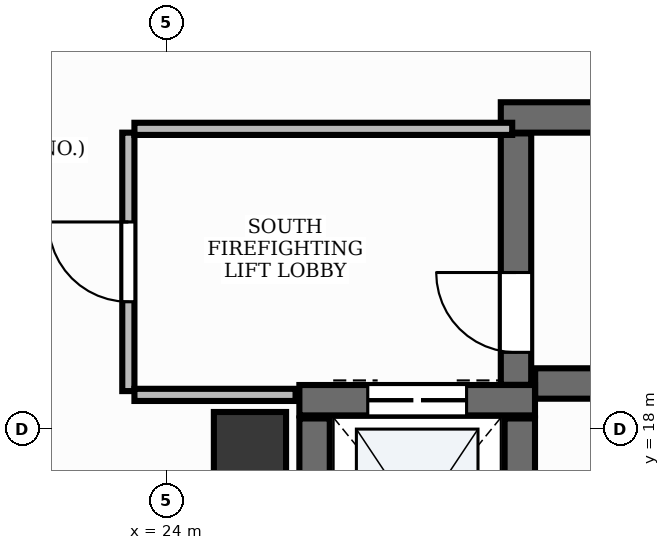
"""IFC4 building model, lengths in metres.
Left out: names, types, materials, properties, quantities, classifications, styles, units other than length and angle.
Written with IfcOpenShell. Run it as: python <this file> out.ifc"""

import sys

from ifc_helpers import new_model, si_unit, direction, frame, frame_2d, origin, origin_2d, place, context, subcontext, project, spatial, rectangle, extrude, element, fill, save


model = new_model("IFC4")
c1 = context("Model", 3, precision=1e-05, world=origin(), true_north=direction((0.0, 1.0)))
c2 = subcontext(c1, "Body", "Model", "MODEL_VIEW")
j1 = project(units=[si_unit("LENGTHUNIT", "METRE"), si_unit("PLANEANGLEUNIT", "RADIAN")], contexts=[c1])
p1 = place(None, origin())
s1 = spatial("IfcSite", under=j1, at=p1, CompositionType="ELEMENT")
p2 = place(p1, origin())
s2 = spatial("IfcBuilding", under=s1, at=p2, CompositionType="ELEMENT")
p3 = place(p2, frame((0.0, 0.0, 213.0)))
s3 = spatial("IfcBuildingStorey", under=s2, at=p3, CompositionType="ELEMENT", Elevation=213.0)
p4 = place(p3, frame((28.852, 18.6, 0.0), z_axis=(0.0, 0.0, 1.0), x_axis=(1.0, 0.0, 0.0)))
e1 = element("IfcWall", 1, at=p4, inside=s3, PredefinedType="SHEAR", context=c2, shape_type="SweptSolid", body=[
    extrude(rectangle(XDim=8.198, YDim=0.4, at=frame_2d((4.099, 0.0))), origin(), (0.0, 0.0, 1.0), 5.1),
])
p5 = place(p3, frame((28.4, 22.1, 0.0), z_axis=(0.0, 0.0, 1.0), x_axis=(1.0, 0.0, 0.0)))
e2 = element("IfcWall", 2, at=p5, inside=s3, PredefinedType="SHEAR", context=c2, shape_type="SweptSolid", body=[
    extrude(rectangle(XDim=8.65, YDim=0.4, at=frame_2d((4.325, 0.0))), origin(), (0.0, 0.0, 1.0), 5.1),
])
p6 = place(p3, frame((28.6, 18.582, 0.0), z_axis=(0.0, 0.0, 1.0), x_axis=(0.0, 1.0, 0.0)))
e3 = element("IfcWall", 3, at=p6, inside=s3, PredefinedType="SHEAR", context=c2, shape_type="SweptSolid", body=[
    extrude(rectangle(XDim=3.308, YDim=0.4, at=frame_2d((1.654, 0.0))), origin(), (0.0, 0.0, 1.0), 5.1),
])
p7 = place(p6, frame((0.428, 0.0, 0.0)))
e4 = element("IfcOpeningElement", 4, at=p7, cuts=e3, PredefinedType="OPENING", context=c2, shape_type="SweptSolid", body=[
    extrude(rectangle(XDim=1.05, YDim=2.15, at=frame_2d((0.525, 1.075))), frame((0.0, 0.215, 0.0), z_axis=(0.0, -1.0, 0.0), x_axis=(1.0, 0.0, 0.0)), (0.0, 0.0, 1.0), 0.43),
])
p8 = place(p3, frame((25.75, 18.38, 0.0), z_axis=(0.0, 0.0, 1.0), x_axis=(1.0, 0.0, 0.0)))
e5 = element("IfcWall", 5, at=p8, inside=s3, PredefinedType="SHEAR", context=c2, shape_type="SweptSolid", body=[
    extrude(rectangle(XDim=3.1, YDim=0.4, at=frame_2d((1.55, 0.0))), origin(), (0.0, 0.0, 1.0), 5.1),
])
p9 = place(p8, frame((0.9, 0.0, 0.0)))
e6 = element("IfcOpeningElement", 6, at=p9, cuts=e5, PredefinedType="OPENING", context=c2, shape_type="SweptSolid", body=[
    extrude(rectangle(XDim=1.3, YDim=2.2, at=frame_2d((0.65, 1.1))), frame((0.0, 0.215, 0.0), z_axis=(0.0, -1.0, 0.0), x_axis=(1.0, 0.0, 0.0)), (0.0, 0.0, 1.0), 0.43),
])
for number, where, z_axis, x_axis in (
    (7, (25.95, 15.44, 0.0), (0.0, 0.0, 1.0), (0.0, 1.0, 0.0)),
    (8, (28.65, 15.44, 0.0), (0.0, 0.0, 1.0), (0.0, 1.0, 0.0)),
):
    element("IfcWall", number, at=place(p3, frame(where, z_axis=z_axis, x_axis=x_axis)), inside=s3, PredefinedType="SHEAR", context=c2, shape_type="SweptSolid", body=[
        extrude(rectangle(XDim=2.7, YDim=0.4, at=frame_2d((1.35, 0.0))), origin(), (0.0, 0.0, 1.0), 5.1),
    ])
p10 = place(p3, frame((25.1, 17.75, -0.0), z_axis=(0.0, 0.0, 1.0), x_axis=(1.0, 0.0, 0.0)))
e9 = element("IfcColumn", 9, at=p10, inside=s3, PredefinedType="PILASTER", context=c2, shape_type="SweptSolid", body=[
    extrude(rectangle(XDim=0.95, YDim=0.95, at=origin_2d()), origin(), (0.0, 0.0, 1.0), 5.101),
])
p11 = place(p3, frame((23.5, 18.5, 0.0), z_axis=(0.0, 0.0, 1.0), x_axis=(0.0, 1.0, 0.0)))
e10 = element("IfcWall", 10, at=p11, inside=s3, PredefinedType="PARTITIONING", context=c2, shape_type="SweptSolid", body=[
    extrude(rectangle(XDim=3.4, YDim=0.16, at=frame_2d((1.7, 0.0))), origin(), (0.0, 0.0, 1.0), 3.41),
])
p12 = place(p11, frame((1.175, 0.0, 0.0)))
e11 = element("IfcOpeningElement", 11, at=p12, cuts=e10, PredefinedType="OPENING", context=c2, shape_type="SweptSolid", body=[
    extrude(rectangle(XDim=1.05, YDim=2.15, at=frame_2d((0.525, 1.075))), frame((0.0, 0.095, 0.0), z_axis=(0.0, -1.0, 0.0), x_axis=(1.0, 0.0, 0.0)), (0.0, 0.0, 1.0), 0.19),
])
p13 = place(p3, frame((23.58, 21.95, 0.0), z_axis=(0.0, 0.0, 1.0), x_axis=(1.0, 0.0, 0.0)))
e12 = element("IfcWall", 12, at=p13, inside=s3, PredefinedType="PARTITIONING", context=c2, shape_type="SweptSolid", body=[
    extrude(rectangle(XDim=4.97, YDim=0.16, at=frame_2d((2.485, 0.0))), origin(), (0.0, 0.0, 1.0), 3.41),
])
p14 = place(p3, frame((23.58, 18.45, 0.0), z_axis=(0.0, 0.0, 1.0), x_axis=(1.0, 0.0, 0.0)))
e13 = element("IfcWall", 13, at=p14, inside=s3, PredefinedType="PARTITIONING", context=c2, shape_type="SweptSolid", body=[
    extrude(rectangle(XDim=2.12, YDim=0.16, at=frame_2d((1.06, 0.0))), origin(), (0.0, 0.0, 1.0), 3.41),
])
p15 = place(p3, frame((29.54, 14.954, 0.0), z_axis=(0.0, 0.0, 1.0), x_axis=(0.069972098323, 0.997548948902, 0.0)))
e14 = element("IfcWall", 14, at=p15, inside=s3, PredefinedType="PARTITIONING", context=c2, shape_type="SweptSolid", body=[
    extrude(rectangle(XDim=3.144, YDim=0.16, at=frame_2d((1.572, 0.0))), origin(), (0.0, 0.0, 1.0), 3.41),
])
p16 = place(p7, origin())
e15 = element("IfcDoor", 15, at=p16, inside=s3, OperationType="SINGLE_SWING_RIGHT", PredefinedType="DOOR", context=c2, shape_type="SweptSolid", body=[
    extrude(rectangle(XDim=1.05, YDim=2.15, at=frame_2d((0.525, 1.075))), frame((0.0, 0.025, 0.0), z_axis=(0.0, -1.0, 0.0), x_axis=(1.0, 0.0, 0.0)), (0.0, 0.0, 1.0), 0.05),
])
fill(e4, e15)
p17 = place(p9, origin())
e16 = element("IfcDoor", 16, at=p17, inside=s3, OperationType="DOUBLE_DOOR_SLIDING", PredefinedType="DOOR", context=c2, shape_type="SweptSolid", body=[
    extrude(rectangle(XDim=1.3, YDim=2.2, at=frame_2d((0.65, 1.1))), frame((0.0, 0.025, 0.0), z_axis=(0.0, -1.0, 0.0), x_axis=(1.0, 0.0, 0.0)), (0.0, 0.0, 1.0), 0.05),
])
fill(e6, e16)
p18 = place(p12, origin())
e17 = element("IfcDoor", 17, at=p18, inside=s3, OperationType="SINGLE_SWING_RIGHT", PredefinedType="DOOR", context=c2, shape_type="SweptSolid", body=[
    extrude(rectangle(XDim=1.05, YDim=2.15, at=frame_2d((0.525, 1.075))), frame((0.0, 0.025, 0.0), z_axis=(0.0, -1.0, 0.0), x_axis=(1.0, 0.0, 0.0)), (0.0, 0.0, 1.0), 0.05),
])
fill(e11, e17)
save(model, sys.argv[1])
